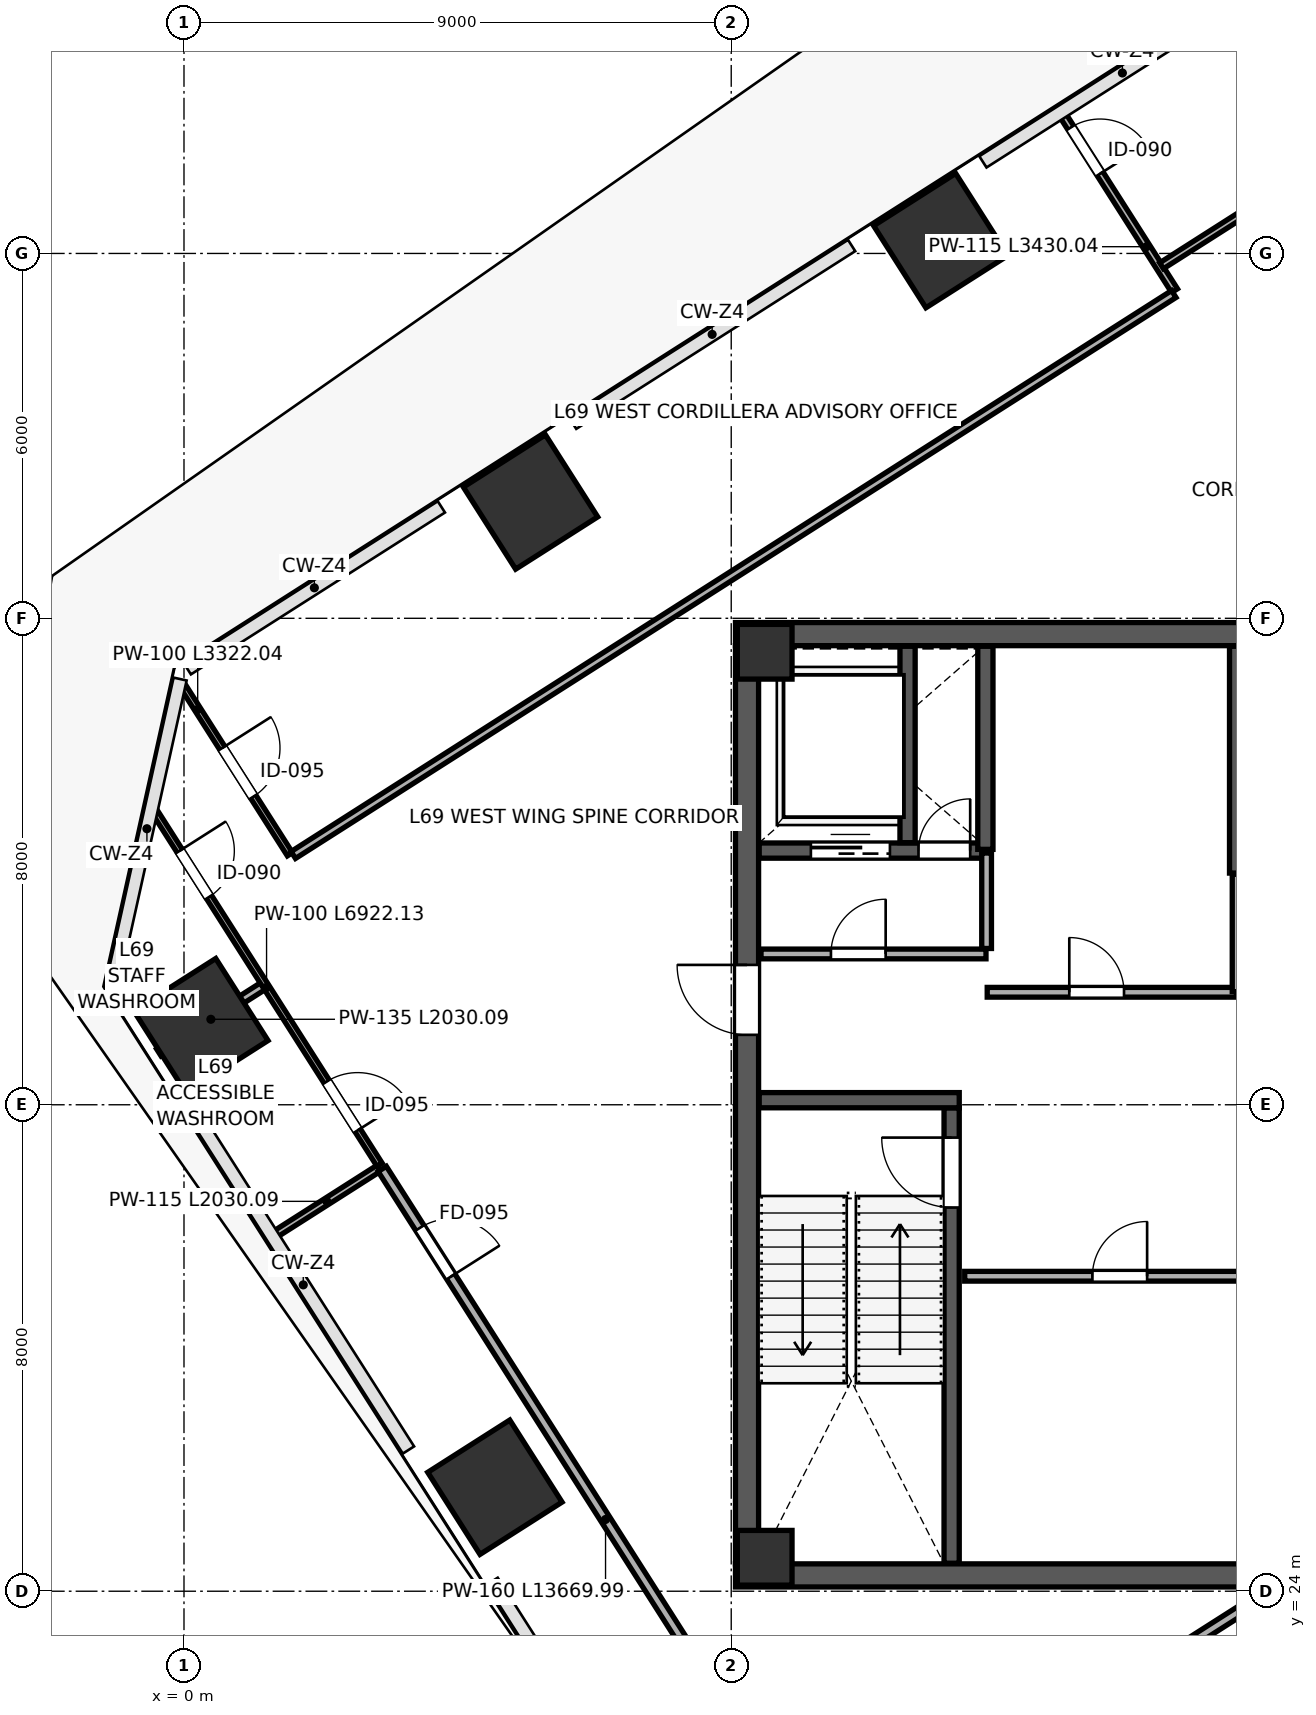
"""IFC4 building model, lengths in metres.
Left out: names, types, materials, properties, quantities, classifications, styles, units other than length and angle.
Written with IfcOpenShell. Run it as: python <this file> out.ifc"""

import sys

from ifc_helpers import new_model, si_unit, direction, frame, frame_2d, origin, origin_2d, place, context, subcontext, project, spatial, rectangle, extrude, source, transform, mapped, element, fill, save


model = new_model("IFC4")
c1 = context("Model", 3, precision=1e-05, world=origin(), true_north=direction((0.0, 1.0)))
c2 = subcontext(c1, "Body", "Model", "MODEL_VIEW")
j1 = project(units=[si_unit("LENGTHUNIT", "METRE"), si_unit("PLANEANGLEUNIT", "RADIAN")], contexts=[c1])
p1 = place(None, origin())
s1 = spatial("IfcSite", under=j1, at=p1, CompositionType="ELEMENT")
p2 = place(p1, origin())
s2 = spatial("IfcBuilding", under=s1, at=p2, CompositionType="ELEMENT")
p3 = place(p2, frame((0.0, 0.0, 307.2)))
s3 = spatial("IfcBuildingStorey", under=s2, at=p3, CompositionType="ELEMENT", Elevation=307.2)
m1 = source(origin(), c2, "Body", "SweptSolid", [
    extrude(rectangle(XDim=0.9, YDim=0.9, at=origin_2d()), origin(), (0.0, 0.0, 1.0), 4.198),
])
for number, where, z_axis, x_axis in (
    (1, (9.55, 24.55, 0.001), (0.0, 0.0, 1.0), (1.0, 0.0, 0.0)),
    (2, (9.55, 39.45, 0.001), (0.0, 0.0, 1.0), (1.0, 0.0, 0.0)),
):
    element("IfcColumn", number, at=place(p3, frame(where, z_axis=z_axis, x_axis=x_axis)), inside=s3, PredefinedType="COLUMN", context=c2, shape_type="MappedRepresentation", body=[
        mapped(m1, transform((0.0, 0.0, 0.0), scale=1.0)),
    ])
m2 = source(origin(), c2, "Body", "SweptSolid", [
    extrude(rectangle(XDim=1.6, YDim=1.6, at=origin_2d()), origin(), (0.0, 0.0, 1.0), 4.198),
])
for number, where, z_axis, x_axis in (
    (3, (0.277, 33.301, 0.001), (0.0, 0.0, 1.0), (-0.537, 0.843, 0.0)),
    (4, (5.113, 25.71, 0.001), (0.0, 0.0, 1.0), (-0.537, 0.843, 0.0)),
    (5, (5.699, 41.913, 0.001), (0.0, 0.0, 1.0), (-0.537, 0.843, 0.0)),
    (6, (12.447, 46.211, 0.001), (0.0, 0.0, 1.0), (-0.537, 0.843, 0.0)),
):
    element("IfcColumn", number, at=place(p3, frame(where, z_axis=z_axis, x_axis=x_axis)), inside=s3, PredefinedType="COLUMN", context=c2, shape_type="MappedRepresentation", body=[
        mapped(m2, transform((0.0, 0.0, 0.0), scale=1.0)),
    ])
p4 = place(p3, frame((9.26, 24.45, 0.0), z_axis=(0.0, 0.0, 1.0), x_axis=(0.0, 1.0, 0.0)))
e7 = element("IfcWall", 7, at=p4, inside=s3, PredefinedType="SHEAR", context=c2, shape_type="SweptSolid", body=[
    extrude(rectangle(XDim=15.1, YDim=0.38, at=frame_2d((7.55, 0.0))), origin(), (0.0, 0.0, 1.0), 3.96),
])
p5 = place(p4, frame((8.7, 0.0, 0.0)))
e8 = element("IfcOpeningElement", 8, at=p5, cuts=e7, PredefinedType="OPENING", context=c2, shape_type="SweptSolid", body=[
    extrude(rectangle(XDim=1.15, YDim=2.2, at=frame_2d((0.575, 1.1))), frame((0.0, 0.2, 0.0), z_axis=(0.0, -1.0, 0.0), x_axis=(1.0, 0.0, 0.0)), (0.0, 0.0, 1.0), 0.4),
])
for number, where, z_axis, x_axis in (
    (9, (9.07, 24.26, 0.0), (0.0, 0.0, 1.0), (1.0, 0.0, 0.0)),
    (10, (9.07, 39.74, 0.0), (0.0, 0.0, 1.0), (1.0, 0.0, 0.0)),
):
    element("IfcWall", number, at=place(p3, frame(where, z_axis=z_axis, x_axis=x_axis)), inside=s3, PredefinedType="SHEAR", context=c2, shape_type="SweptSolid", body=[
        extrude(rectangle(XDim=17.86, YDim=0.38, at=frame_2d((8.93, 0.0))), origin(), (0.0, 0.0, 1.0), 3.96),
    ])
p6 = place(p3, frame((12.625, 24.46, 0.0), z_axis=(0.0, 0.0, 1.0), x_axis=(0.0, 1.0, 0.0)))
e11 = element("IfcWall", 11, at=p6, inside=s3, PredefinedType="SHEAR", context=c2, shape_type="SweptSolid", body=[
    extrude(rectangle(XDim=7.49, YDim=0.25, at=frame_2d((3.745, 0.0))), origin(), (0.0, 0.0, 1.0), 3.96),
])
p7 = place(p6, frame((5.85, 0.0, 0.0)))
e12 = element("IfcOpeningElement", 12, at=p7, cuts=e11, PredefinedType="OPENING", context=c2, shape_type="SweptSolid", body=[
    extrude(rectangle(XDim=1.15, YDim=2.2, at=frame_2d((0.575, 1.1))), frame((0.0, 0.135, 0.0), z_axis=(0.0, -1.0, 0.0), x_axis=(1.0, 0.0, 0.0)), (0.0, 0.0, 1.0), 0.27),
])
p8 = place(p3, frame((9.46, 32.075, 0.0), z_axis=(0.0, 0.0, 1.0), x_axis=(1.0, 0.0, 0.0)))
e13 = element("IfcWall", 13, at=p8, inside=s3, PredefinedType="SHEAR", context=c2, shape_type="SweptSolid", body=[
    extrude(rectangle(XDim=3.29, YDim=0.25, at=frame_2d((1.645, 0.0))), origin(), (0.0, 0.0, 1.0), 3.96),
])
p9 = place(p3, frame((9.46, 36.18, 0.0), z_axis=(0.0, 0.0, 1.0), x_axis=(1.0, 0.0, 0.0)))
e14 = element("IfcWall", 14, at=p9, inside=s3, PredefinedType="SHEAR", context=c2, shape_type="SweptSolid", body=[
    extrude(rectangle(XDim=3.79, YDim=0.25, at=frame_2d((1.895, 0.0))), origin(), (0.0, 0.0, 1.0), 3.96),
])
p10 = place(p9, frame((2.62, 0.0, 0.0)))
e15 = element("IfcOpeningElement", 15, at=p10, cuts=e14, PredefinedType="OPENING", context=c2, shape_type="SweptSolid", body=[
    extrude(rectangle(XDim=0.85, YDim=2.1, at=frame_2d((0.425, 1.05))), frame((0.0, 0.135, 0.0), z_axis=(0.0, -1.0, 0.0), x_axis=(1.0, 0.0, 0.0)), (0.0, 0.0, 1.0), 0.27),
])
p11 = place(p9, frame((0.85, 0.0, 0.0)))
e16 = element("IfcOpeningElement", 16, at=p11, cuts=e14, PredefinedType="OPENING", context=c2, shape_type="SweptSolid", body=[
    extrude(rectangle(XDim=1.3, YDim=2.25, at=frame_2d((0.65, 1.125))), frame((0.0, 0.135, 0.0), z_axis=(0.0, -1.0, 0.0), x_axis=(1.0, 0.0, 0.0)), (0.0, 0.0, 1.0), 0.27),
])
p12 = place(p3, frame((11.9, 36.31, 0.0), z_axis=(0.0, 0.0, 1.0), x_axis=(0.0, 1.0, 0.0)))
e17 = element("IfcWall", 17, at=p12, inside=s3, PredefinedType="SHEAR", context=c2, shape_type="SweptSolid", body=[
    extrude(rectangle(XDim=3.23, YDim=0.25, at=frame_2d((1.615, 0.0))), origin(), (0.0, 0.0, 1.0), 3.96),
])
p13 = place(p3, frame((13.18, 36.2, 0.0), z_axis=(0.0, 0.0, 1.0), x_axis=(0.0, 1.0, 0.0)))
e18 = element("IfcWall", 18, at=p13, inside=s3, PredefinedType="SHEAR", context=c2, shape_type="SweptSolid", body=[
    extrude(rectangle(XDim=3.34, YDim=0.25, at=frame_2d((1.67, 0.0))), origin(), (0.0, 0.0, 1.0), 3.96),
])
p14 = place(p3, frame((17.32, 35.81, 0.0), z_axis=(0.0, 0.0, 1.0), x_axis=(0.0, 1.0, 0.0)))
e19 = element("IfcWall", 19, at=p14, inside=s3, PredefinedType="SHEAR", context=c2, shape_type="SweptSolid", body=[
    extrude(rectangle(XDim=3.73, YDim=0.25, at=frame_2d((1.865, 0.0))), origin(), (0.0, 0.0, 1.0), 3.96),
])
p15 = place(p3, frame((9.49, 34.48, 0.0), z_axis=(0.0, 0.0, 1.0), x_axis=(1.0, 0.0, 0.0)))
e20 = element("IfcWall", 20, at=p15, inside=s3, PredefinedType="PARTITIONING", context=c2, shape_type="SweptSolid", body=[
    extrude(rectangle(XDim=3.7, YDim=0.16, at=frame_2d((1.85, 0.0))), origin(), (0.0, 0.0, 1.0), 3.96),
])
p16 = place(p15, frame((1.15, 0.0, 0.0)))
e21 = element("IfcOpeningElement", 21, at=p16, cuts=e20, PredefinedType="OPENING", context=c2, shape_type="SweptSolid", body=[
    extrude(rectangle(XDim=0.9, YDim=2.15, at=frame_2d((0.45, 1.075))), frame((0.0, 0.09, 0.0), z_axis=(0.0, -1.0, 0.0), x_axis=(1.0, 0.0, 0.0)), (0.0, 0.0, 1.0), 0.18),
])
p17 = place(p3, frame((13.2, 34.57, 0.0), z_axis=(0.0, 0.0, 1.0), x_axis=(0.0, 1.0, 0.0)))
e22 = element("IfcWall", 22, at=p17, inside=s3, PredefinedType="PARTITIONING", context=c2, shape_type="SweptSolid", body=[
    extrude(rectangle(XDim=1.57, YDim=0.16, at=frame_2d((0.785, 0.0))), origin(), (0.0, 0.0, 1.0), 3.96),
])
p18 = place(p3, frame((13.21, 33.85, 0.0), z_axis=(0.0, 0.0, 1.0), x_axis=(1.0, 0.0, 0.0)))
e23 = element("IfcWall", 23, at=p18, inside=s3, PredefinedType="PARTITIONING", context=c2, shape_type="SweptSolid", body=[
    extrude(rectangle(XDim=4.1, YDim=0.16, at=frame_2d((2.05, 0.0))), origin(), (0.0, 0.0, 1.0), 3.96),
])
p19 = place(p18, frame((1.35, 0.0, 0.0)))
e24 = element("IfcOpeningElement", 24, at=p19, cuts=e23, PredefinedType="OPENING", context=c2, shape_type="SweptSolid", body=[
    extrude(rectangle(XDim=0.9, YDim=2.15, at=frame_2d((0.45, 1.075))), frame((0.0, 0.09, 0.0), z_axis=(0.0, -1.0, 0.0), x_axis=(1.0, 0.0, 0.0)), (0.0, 0.0, 1.0), 0.18),
])
p20 = place(p3, frame((17.32, 33.86, 0.0), z_axis=(0.0, 0.0, 1.0), x_axis=(0.0, 1.0, 0.0)))
e25 = element("IfcWall", 25, at=p20, inside=s3, PredefinedType="PARTITIONING", context=c2, shape_type="SweptSolid", body=[
    extrude(rectangle(XDim=1.93, YDim=0.16, at=frame_2d((0.965, 0.0))), origin(), (0.0, 0.0, 1.0), 3.96),
])
p21 = place(p3, frame((12.84, 29.18, 0.0), z_axis=(0.0, 0.0, 1.0), x_axis=(1.0, 0.0, 0.0)))
e26 = element("IfcWall", 26, at=p21, inside=s3, PredefinedType="PARTITIONING", context=c2, shape_type="SweptSolid", body=[
    extrude(rectangle(XDim=8.37, YDim=0.16, at=frame_2d((4.185, 0.0))), origin(), (0.0, 0.0, 1.0), 3.96),
])
p22 = place(p21, frame((2.1, 0.0, 0.0)))
e27 = element("IfcOpeningElement", 27, at=p22, cuts=e26, PredefinedType="OPENING", context=c2, shape_type="SweptSolid", body=[
    extrude(rectangle(XDim=0.9, YDim=2.15, at=frame_2d((0.45, 1.075))), frame((0.0, 0.09, 0.0), z_axis=(0.0, -1.0, 0.0), x_axis=(1.0, 0.0, 0.0)), (0.0, 0.0, 1.0), 0.18),
])
p23 = place(p21, frame((6.2, 0.0, 0.0)))
e28 = element("IfcOpeningElement", 28, at=p23, cuts=e26, PredefinedType="OPENING", context=c2, shape_type="SweptSolid", body=[
    extrude(rectangle(XDim=0.85, YDim=2.1, at=frame_2d((0.425, 1.05))), frame((0.0, 0.09, 0.0), z_axis=(0.0, -1.0, 0.0), x_axis=(1.0, 0.0, 0.0)), (0.0, 0.0, 1.0), 0.18),
])
p24 = place(p3, frame((-0.414, 32.86, 0.0), z_axis=(0.0, 0.0, 1.0), x_axis=(0.843468317829, 0.5371789244, 0.0)))
e29 = element("IfcWall", 29, at=p24, inside=s3, PredefinedType="PARTITIONING", context=c2, shape_type="SweptSolid", body=[
    extrude(rectangle(XDim=2.03, YDim=0.135, at=frame_2d((1.015, 0.0))), origin(), (0.0, 0.0, 1.0), 3.295),
])
p25 = place(p3, frame((1.493, 29.866, 0.0), z_axis=(0.0, 0.0, 1.0), x_axis=(0.843433611632, 0.537233415537, 0.0)))
e30 = element("IfcWall", 30, at=p25, inside=s3, PredefinedType="PARTITIONING", context=c2, shape_type="SweptSolid", body=[
    extrude(rectangle(XDim=2.03, YDim=0.115, at=frame_2d((1.015, 0.0))), origin(), (0.0, 0.0, 1.0), 3.295),
])
p26 = place(p3, frame((-0.502, 36.85, 0.0), z_axis=(0.0, 0.0, 1.0), x_axis=(0.537309039539, -0.843385437407, 0.0)))
e31 = element("IfcWall", 31, at=p26, inside=s3, PredefinedType="PARTITIONING", context=c2, shape_type="SweptSolid", body=[
    extrude(rectangle(XDim=6.922, YDim=0.1, at=frame_2d((3.461, 0.0))), origin(), (0.0, 0.0, 1.0), 3.96),
])
p27 = place(p26, frame((0.8, 0.0, 0.0)))
e32 = element("IfcOpeningElement", 32, at=p27, cuts=e31, PredefinedType="OPENING", context=c2, shape_type="SweptSolid", body=[
    extrude(rectangle(XDim=0.9, YDim=2.15, at=frame_2d((0.45, 1.075))), frame((0.0, 0.06, 0.0), z_axis=(0.0, -1.0, 0.0), x_axis=(1.0, 0.0, 0.0)), (0.0, 0.0, 1.0), 0.12),
])
p28 = place(p26, frame((5.3, 0.0, 0.0)))
e33 = element("IfcOpeningElement", 33, at=p28, cuts=e31, PredefinedType="OPENING", context=c2, shape_type="SweptSolid", body=[
    extrude(rectangle(XDim=0.95, YDim=2.15, at=frame_2d((0.475, 1.075))), frame((0.0, 0.06, 0.0), z_axis=(0.0, -1.0, 0.0), x_axis=(1.0, 0.0, 0.0)), (0.0, 0.0, 1.0), 0.12),
])
p29 = place(p3, frame((3.26, 30.945, 0.0), z_axis=(0.0, 0.0, 1.0), x_axis=(0.537307625317, -0.843386338386, 0.0)))
e34 = element("IfcWall", 34, at=p29, inside=s3, PredefinedType="PARTITIONING", context=c2, shape_type="SweptSolid", body=[
    extrude(rectangle(XDim=13.67, YDim=0.16, at=frame_2d((6.835, 0.0))), origin(), (0.0, 0.0, 1.0), 3.96),
])
p30 = place(p29, frame((1.15, 0.0, 0.0)))
e35 = element("IfcOpeningElement", 35, at=p30, cuts=e34, PredefinedType="OPENING", context=c2, shape_type="SweptSolid", body=[
    extrude(rectangle(XDim=0.95, YDim=2.15, at=frame_2d((0.475, 1.075))), frame((0.0, 0.09, 0.0), z_axis=(0.0, -1.0, 0.0), x_axis=(1.0, 0.0, 0.0)), (0.0, 0.0, 1.0), 0.18),
])
p31 = place(p3, frame((10.661, 19.403, 0.0), z_axis=(0.0, 0.0, 1.0), x_axis=(0.843399441764, 0.537287057012, 0.0)))
e36 = element("IfcWall", 36, at=p31, inside=s3, PredefinedType="PARTITIONING", context=c2, shape_type="SweptSolid", body=[
    extrude(rectangle(XDim=8.366, YDim=0.16, at=frame_2d((4.183, 0.0))), origin(), (0.0, 0.0, 1.0), 3.96),
])
p32 = place(p3, frame((14.448, 48.281, 0.0), z_axis=(0.0, 0.0, 1.0), x_axis=(0.537285301829, -0.843400559899, 0.0)))
e37 = element("IfcWall", 37, at=p32, inside=s3, PredefinedType="PARTITIONING", context=c2, shape_type="SweptSolid", body=[
    extrude(rectangle(XDim=3.43, YDim=0.115, at=frame_2d((1.715, 0.0))), origin(), (0.0, 0.0, 1.0), 3.295),
])
p33 = place(p32, frame((0.25, 0.0, 0.0)))
e38 = element("IfcOpeningElement", 38, at=p33, cuts=e37, PredefinedType="OPENING", context=c2, shape_type="SweptSolid", body=[
    extrude(rectangle(XDim=0.9, YDim=2.15, at=frame_2d((0.45, 1.075))), frame((0.0, 0.067, 0.0), z_axis=(0.0, -1.0, 0.0), x_axis=(1.0, 0.0, 0.0)), (0.0, 0.0, 1.0), 0.135),
])
p34 = place(p3, frame((-0.042, 38.921, 0.0), z_axis=(0.0, 0.0, 1.0), x_axis=(0.537298651026, -0.843392055693, 0.0)))
e39 = element("IfcWall", 39, at=p34, inside=s3, PredefinedType="PARTITIONING", context=c2, shape_type="SweptSolid", body=[
    extrude(rectangle(XDim=3.322, YDim=0.1, at=frame_2d((1.661, 0.0))), origin(), (0.0, 0.0, 1.0), 3.96),
])
p35 = place(p34, frame((1.25, 0.0, 0.0)))
e40 = element("IfcOpeningElement", 40, at=p35, cuts=e39, PredefinedType="OPENING", context=c2, shape_type="SweptSolid", body=[
    extrude(rectangle(XDim=0.95, YDim=2.15, at=frame_2d((0.475, 1.075))), frame((0.0, 0.06, 0.0), z_axis=(0.0, -1.0, 0.0), x_axis=(1.0, 0.0, 0.0)), (0.0, 0.0, 1.0), 0.12),
])
p36 = place(p3, frame((1.798, 36.107, 0.0), z_axis=(0.0, 0.0, 1.0), x_axis=(0.843396745572, 0.537291289301, 0.0)))
e41 = element("IfcWall", 41, at=p36, inside=s3, PredefinedType="PARTITIONING", context=c2, shape_type="SweptSolid", body=[
    extrude(rectangle(XDim=17.17, YDim=0.135, at=frame_2d((8.585, 0.0))), origin(), (0.0, 0.0, 1.0), 3.96),
])
p37 = place(p3, frame((16.077, 45.797, 0.0), z_axis=(0.0, 0.0, 1.0), x_axis=(0.843392973199, 0.537297210824, 0.0)))
e42 = element("IfcWall", 42, at=p37, inside=s3, PredefinedType="PARTITIONING", context=c2, shape_type="SweptSolid", body=[
    extrude(rectangle(XDim=12.472, YDim=0.115, at=frame_2d((6.236, 0.0))), origin(), (0.0, 0.0, 1.0), 3.96),
])
p38 = place(p3, frame((9.687, 17.004, 0.0), z_axis=(0.0, 0.0, 1.0), x_axis=(0.843392646996, 0.537297722862, 0.0)))
e43 = element("IfcWall", 43, at=p38, inside=s3, PredefinedType="PARTITIONING", context=c2, shape_type="SweptSolid", body=[
    extrude(rectangle(XDim=12.831, YDim=0.16, at=frame_2d((6.416, 0.0))), origin(), (0.0, 0.0, 1.0), 3.96),
])
m3 = source(origin(), c2, "Body", "SweptSolid", [
    extrude(rectangle(XDim=1.15, YDim=2.2, at=frame_2d((0.575, 1.1))), frame((0.0, 0.025, 0.0), z_axis=(0.0, -1.0, 0.0), x_axis=(1.0, 0.0, 0.0)), (0.0, 0.0, 1.0), 0.05),
])
p39 = place(p7, origin())
e44 = element("IfcDoor", 44, at=p39, inside=s3, OperationType="SINGLE_SWING_RIGHT", PredefinedType="DOOR", context=c2, shape_type="MappedRepresentation", body=[
    mapped(m3, transform((0.0, 0.0, 0.0), scale=1.0)),
])
fill(e12, e44)
m4 = source(origin(), c2, "Body", "SweptSolid", [
    extrude(rectangle(XDim=1.15, YDim=2.2, at=frame_2d((0.575, 1.1))), frame((0.0, 0.025, 0.0), z_axis=(0.0, -1.0, 0.0), x_axis=(1.0, 0.0, 0.0)), (0.0, 0.0, 1.0), 0.05),
])
p40 = place(p5, origin())
e45 = element("IfcDoor", 45, at=p40, inside=s3, OperationType="SINGLE_SWING_RIGHT", PredefinedType="DOOR", context=c2, shape_type="MappedRepresentation", body=[
    mapped(m4, transform((0.0, 0.0, 0.0), scale=1.0)),
])
fill(e8, e45)
m5 = source(origin(), c2, "Body", "SweptSolid", [
    extrude(rectangle(XDim=0.85, YDim=2.1, at=frame_2d((0.425, 1.05))), frame((0.0, 0.025, 0.0), z_axis=(0.0, -1.0, 0.0), x_axis=(1.0, 0.0, 0.0)), (0.0, 0.0, 1.0), 0.05),
])
p41 = place(p10, origin())
e46 = element("IfcDoor", 46, at=p41, inside=s3, OperationType="SINGLE_SWING_RIGHT", PredefinedType="DOOR", context=c2, shape_type="MappedRepresentation", body=[
    mapped(m5, transform((0.0, 0.0, 0.0), scale=1.0)),
])
fill(e15, e46)
m6 = source(origin(), c2, "Body", "SweptSolid", [
    extrude(rectangle(XDim=1.3, YDim=2.25, at=frame_2d((0.65, 1.125))), frame((0.0, 0.025, 0.0), z_axis=(0.0, -1.0, 0.0), x_axis=(1.0, 0.0, 0.0)), (0.0, 0.0, 1.0), 0.05),
])
p42 = place(p11, origin())
e47 = element("IfcDoor", 47, at=p42, inside=s3, OperationType="SLIDING_TO_LEFT", PredefinedType="DOOR", context=c2, shape_type="MappedRepresentation", body=[
    mapped(m6, transform((0.0, 0.0, 0.0), scale=1.0)),
])
fill(e16, e47)
m7 = source(origin(), c2, "Body", "SweptSolid", [
    extrude(rectangle(XDim=0.9, YDim=2.15, at=frame_2d((0.45, 1.075))), frame((0.0, 0.025, 0.0), z_axis=(0.0, -1.0, 0.0), x_axis=(1.0, 0.0, 0.0)), (0.0, 0.0, 1.0), 0.05),
])
p43 = place(p16, origin())
e48 = element("IfcDoor", 48, at=p43, inside=s3, OperationType="SINGLE_SWING_RIGHT", PredefinedType="DOOR", context=c2, shape_type="MappedRepresentation", body=[
    mapped(m7, transform((0.0, 0.0, 0.0), scale=1.0)),
])
fill(e21, e48)
p44 = place(p19, origin())
e49 = element("IfcDoor", 49, at=p44, inside=s3, OperationType="SINGLE_SWING_LEFT", PredefinedType="DOOR", context=c2, shape_type="MappedRepresentation", body=[
    mapped(m7, transform((0.0, 0.0, 0.0), scale=1.0)),
])
fill(e24, e49)
p45 = place(p22, origin())
e50 = element("IfcDoor", 50, at=p45, inside=s3, OperationType="SINGLE_SWING_RIGHT", PredefinedType="DOOR", context=c2, shape_type="MappedRepresentation", body=[
    mapped(m7, transform((0.0, 0.0, 0.0), scale=1.0)),
])
fill(e27, e50)
m8 = source(origin(), c2, "Body", "SweptSolid", [
    extrude(rectangle(XDim=0.9, YDim=2.15, at=frame_2d((0.45, 1.075))), frame((0.0, 0.025, 0.0), z_axis=(0.0, -1.0, 0.0), x_axis=(1.0, 0.0, 0.0)), (0.0, 0.0, 1.0), 0.05),
])
p46 = place(p27, origin())
e51 = element("IfcDoor", 51, at=p46, inside=s3, OperationType="SINGLE_SWING_LEFT", PredefinedType="DOOR", context=c2, shape_type="MappedRepresentation", body=[
    mapped(m8, transform((0.0, 0.0, 0.0), scale=1.0)),
])
fill(e32, e51)
m9 = source(origin(), c2, "Body", "SweptSolid", [
    extrude(rectangle(XDim=0.95, YDim=2.15, at=frame_2d((0.475, 1.075))), frame((0.0, 0.025, 0.0), z_axis=(0.0, -1.0, 0.0), x_axis=(1.0, 0.0, 0.0)), (0.0, 0.0, 1.0), 0.05),
])
p47 = place(p28, origin())
e52 = element("IfcDoor", 52, at=p47, inside=s3, OperationType="SINGLE_SWING_RIGHT", PredefinedType="DOOR", context=c2, shape_type="MappedRepresentation", body=[
    mapped(m9, transform((0.0, 0.0, 0.0), scale=1.0)),
])
fill(e33, e52)
m10 = source(origin(), c2, "Body", "SweptSolid", [
    extrude(rectangle(XDim=0.95, YDim=2.15, at=frame_2d((0.475, 1.075))), frame((0.0, 0.025, 0.0), z_axis=(0.0, -1.0, 0.0), x_axis=(1.0, 0.0, 0.0)), (0.0, 0.0, 1.0), 0.05),
])
p48 = place(p30, origin())
e53 = element("IfcDoor", 53, at=p48, inside=s3, OperationType="SINGLE_SWING_RIGHT", PredefinedType="DOOR", context=c2, shape_type="MappedRepresentation", body=[
    mapped(m10, transform((0.0, 0.0, 0.0), scale=1.0)),
])
fill(e35, e53)
p49 = place(p35, origin())
e54 = element("IfcDoor", 54, at=p49, inside=s3, OperationType="SINGLE_SWING_LEFT", PredefinedType="DOOR", context=c2, shape_type="MappedRepresentation", body=[
    mapped(m9, transform((0.0, 0.0, 0.0), scale=1.0)),
])
fill(e40, e54)
p50 = place(p33, origin())
e55 = element("IfcDoor", 55, at=p50, inside=s3, OperationType="SINGLE_SWING_RIGHT", PredefinedType="DOOR", context=c2, shape_type="MappedRepresentation", body=[
    mapped(m8, transform((0.0, 0.0, 0.0), scale=1.0)),
])
fill(e38, e55)
save(model, sys.argv[1])
